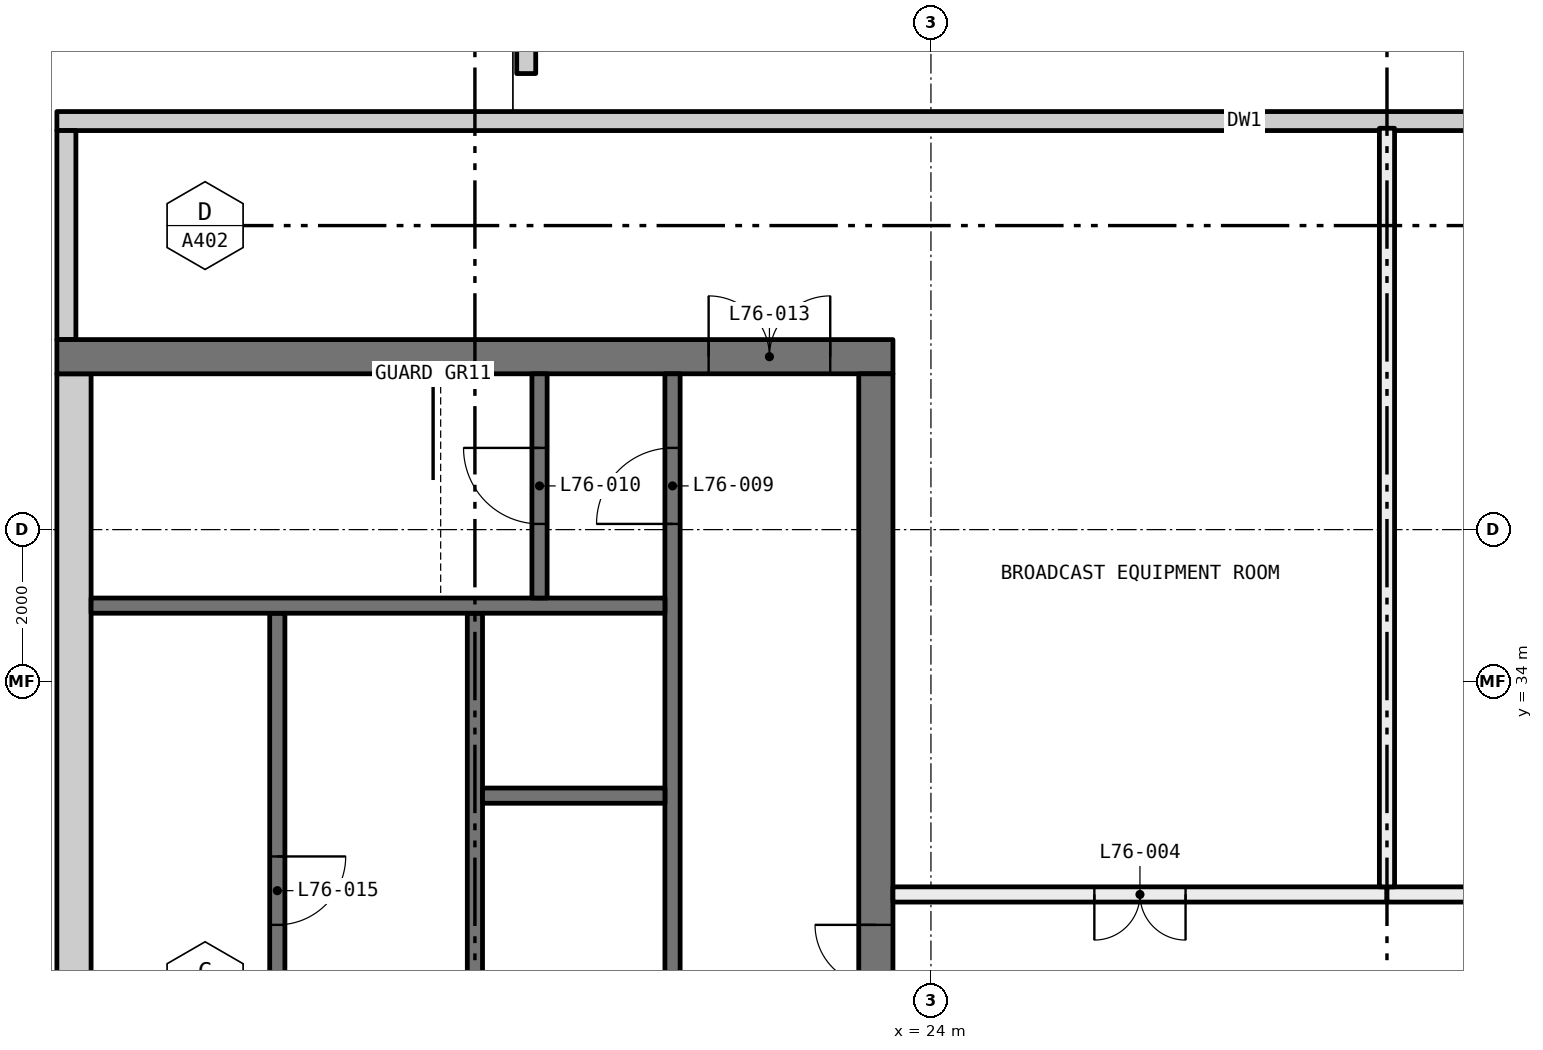
"""IFC4 building model, lengths in metres.
Left out: names, types, materials, properties, quantities, classifications, styles, units other than length and angle.
Written with IfcOpenShell. Run it as: python <this file> out.ifc"""

import sys

from ifc_helpers import new_model, si_unit, direction, frame, frame_2d, origin, place, context, subcontext, project, spatial, rectangle, extrude, element, fill, save


model = new_model("IFC4")
c1 = context("Model", 3, precision=1e-05, world=origin(), true_north=direction((0.0, 1.0)))
c2 = subcontext(c1, "Body", "Model", "MODEL_VIEW")
j1 = project(units=[si_unit("LENGTHUNIT", "METRE"), si_unit("PLANEANGLEUNIT", "RADIAN")], contexts=[c1])
p1 = place(None, origin())
s1 = spatial("IfcSite", under=j1, at=p1, CompositionType="ELEMENT")
p2 = place(p1, origin())
s2 = spatial("IfcBuilding", under=s1, at=p2, CompositionType="ELEMENT")
p3 = place(p2, frame((0.0, 0.0, 283.35)))
s3 = spatial("IfcBuildingStorey", under=s2, at=p3, CompositionType="ELEMENT", Elevation=283.35)
p4 = place(p3, frame((18.675, 42.0, 0.0), z_axis=(0.0, 0.0, 1.0), x_axis=(0.0, 1.0, 0.0)))
e1 = element("IfcWall", 1, at=p4, inside=s3, PredefinedType="PARAPET", context=c2, shape_type="SweptSolid", body=[
    extrude(rectangle(XDim=5.2, YDim=0.25, at=frame_2d((2.6, 0.0))), origin(), (0.0, 0.0, 1.0), 1.1),
])
p5 = place(p3, frame((30.0, 31.2, 0.0), z_axis=(0.0, 0.0, 1.0), x_axis=(-1.0, 0.0, 0.0)))
e2 = element("IfcWall", 2, at=p5, inside=s3, PredefinedType="PARTITIONING", context=c2, shape_type="SweptSolid", body=[
    extrude(rectangle(XDim=6.5, YDim=0.2, at=frame_2d((3.25, 0.0))), origin(), (0.0, 0.0, 1.0), 3.6),
])
p6 = place(p5, frame((2.65, 0.0, 0.0)))
e3 = element("IfcOpeningElement", 3, at=p6, cuts=e2, PredefinedType="OPENING", context=c2, shape_type="SweptSolid", body=[
    extrude(rectangle(XDim=1.2, YDim=2.1, at=frame_2d((0.6, 1.05))), frame((0.0, 0.11, 0.0), z_axis=(0.0, -1.0, 0.0), x_axis=(1.0, 0.0, 0.0)), (0.0, 0.0, 1.0), 0.22),
])
p7 = place(p3, frame((42.0, 31.2, 0.0), z_axis=(0.0, 0.0, 1.0), x_axis=(-1.0, 0.0, 0.0)))
e4 = element("IfcWall", 4, at=p7, inside=s3, PredefinedType="PARTITIONING", context=c2, shape_type="SweptSolid", body=[
    extrude(rectangle(XDim=12.0, YDim=0.2, at=frame_2d((6.0, 0.0))), origin(), (0.0, 0.0, 1.0), 3.6),
])
p8 = place(p7, frame((5.4, 0.0, 0.0)))
e5 = element("IfcOpeningElement", 5, at=p8, cuts=e4, PredefinedType="OPENING", context=c2, shape_type="SweptSolid", body=[
    extrude(rectangle(XDim=1.2, YDim=2.1, at=frame_2d((0.6, 1.05))), frame((0.0, 0.11, 0.0), z_axis=(0.0, -1.0, 0.0), x_axis=(1.0, 0.0, 0.0)), (0.0, 0.0, 1.0), 0.22),
])
p9 = place(p3, frame((30.0, 31.3, 0.0), z_axis=(0.0, 0.0, 1.0), x_axis=(0.0, 1.0, 0.0)))
e6 = element("IfcWall", 6, at=p9, inside=s3, PredefinedType="PARTITIONING", context=c2, shape_type="SweptSolid", body=[
    extrude(rectangle(XDim=9.98, YDim=0.2, at=frame_2d((4.99, 0.0))), origin(), (0.0, 0.0, 1.0), 5.6),
])
p10 = place(p3, frame((12.5, 38.275, 0.0), z_axis=(0.0, 0.0, 1.0), x_axis=(1.0, 0.0, 0.0)))
e7 = element("IfcWall", 7, at=p10, inside=s3, PredefinedType="SHEAR", context=c2, shape_type="SweptSolid", body=[
    extrude(rectangle(XDim=11.0, YDim=0.45, at=frame_2d((5.5, 0.0))), origin(), (0.0, 0.0, 1.0), 5.6),
])
p11 = place(p10, frame((8.575, 0.0, 0.0)))
e8 = element("IfcOpeningElement", 8, at=p11, cuts=e7, PredefinedType="OPENING", context=c2, shape_type="SweptSolid", body=[
    extrude(rectangle(XDim=1.6, YDim=2.1, at=frame_2d((0.8, 1.05))), frame((0.0, 0.235, 0.0), z_axis=(0.0, -1.0, 0.0), x_axis=(1.0, 0.0, 0.0)), (0.0, 0.0, 1.0), 0.47),
])
p12 = place(p3, frame((12.725, 21.95, 0.0), z_axis=(0.0, 0.0, 1.0), x_axis=(0.0, 1.0, 0.0)))
e9 = element("IfcWall", 9, at=p12, inside=s3, PredefinedType="SHEAR", context=c2, shape_type="SweptSolid", body=[
    extrude(rectangle(XDim=16.1, YDim=0.45, at=frame_2d((8.05, 0.0))), origin(), (0.0, 0.0, 1.0), 5.6),
])
p13 = place(p3, frame((23.275, 21.95, 0.0), z_axis=(0.0, 0.0, 1.0), x_axis=(0.0, 1.0, 0.0)))
e10 = element("IfcWall", 10, at=p13, inside=s3, PredefinedType="SHEAR", context=c2, shape_type="SweptSolid", body=[
    extrude(rectangle(XDim=16.1, YDim=0.45, at=frame_2d((8.05, 0.0))), origin(), (0.0, 0.0, 1.0), 5.6),
])
p14 = place(p13, frame((7.25, 0.0, 0.0)))
e11 = element("IfcOpeningElement", 11, at=p14, cuts=e10, PredefinedType="OPENING", context=c2, shape_type="SweptSolid", body=[
    extrude(rectangle(XDim=1.6, YDim=2.1, at=frame_2d((0.8, 1.05))), frame((0.0, 0.235, 0.0), z_axis=(0.0, -1.0, 0.0), x_axis=(1.0, 0.0, 0.0)), (0.0, 0.0, 1.0), 0.47),
])
p15 = place(p3, frame((15.4, 21.95, 0.0), z_axis=(0.0, 0.0, 1.0), x_axis=(0.0, 1.0, 0.0)))
e12 = element("IfcWall", 12, at=p15, inside=s3, PredefinedType="SOLIDWALL", context=c2, shape_type="SweptSolid", body=[
    extrude(rectangle(XDim=12.95, YDim=0.2, at=frame_2d((6.475, 0.0))), origin(), (0.0, 0.0, 1.0), 5.6),
])
p16 = place(p15, frame((3.75, 0.0, 0.0)))
e13 = element("IfcOpeningElement", 13, at=p16, cuts=e12, PredefinedType="OPENING", context=c2, shape_type="SweptSolid", body=[
    extrude(rectangle(XDim=1.1, YDim=2.1, at=frame_2d((0.55, 1.05))), frame((0.0, 0.11, 0.0), z_axis=(0.0, -1.0, 0.0), x_axis=(1.0, 0.0, 0.0)), (0.0, 0.0, 1.0), 0.22),
])
p17 = place(p15, frame((0.15, 0.0, 0.0)))
e14 = element("IfcOpeningElement", 14, at=p17, cuts=e12, PredefinedType="OPENING", context=c2, shape_type="SweptSolid", body=[
    extrude(rectangle(XDim=1.0, YDim=2.1, at=frame_2d((0.5, 1.05))), frame((0.0, 0.11, 0.0), z_axis=(0.0, -1.0, 0.0), x_axis=(1.0, 0.0, 0.0)), (0.0, 0.0, 1.0), 0.22),
])
p18 = place(p15, frame((8.85, 0.0, 0.0)))
e15 = element("IfcOpeningElement", 15, at=p18, cuts=e12, PredefinedType="OPENING", context=c2, shape_type="SweptSolid", body=[
    extrude(rectangle(XDim=0.9, YDim=2.1, at=frame_2d((0.45, 1.05))), frame((0.0, 0.11, 0.0), z_axis=(0.0, -1.0, 0.0), x_axis=(1.0, 0.0, 0.0)), (0.0, 0.0, 1.0), 0.22),
])
p19 = place(p3, frame((20.6, 25.1, 0.0), z_axis=(0.0, 0.0, 1.0), x_axis=(0.0, 1.0, 0.0)))
e16 = element("IfcWall", 16, at=p19, inside=s3, PredefinedType="SOLIDWALL", context=c2, shape_type="SweptSolid", body=[
    extrude(rectangle(XDim=12.95, YDim=0.2, at=frame_2d((6.475, 0.0))), origin(), (0.0, 0.0, 1.0), 5.6),
])
p20 = place(p19, frame((0.6, 0.0, 0.0)))
e17 = element("IfcOpeningElement", 17, at=p20, cuts=e16, PredefinedType="OPENING", context=c2, shape_type="SweptSolid", body=[
    extrude(rectangle(XDim=1.1, YDim=2.1, at=frame_2d((0.55, 1.05))), frame((0.0, 0.11, 0.0), z_axis=(0.0, -1.0, 0.0), x_axis=(1.0, 0.0, 0.0)), (0.0, 0.0, 1.0), 0.22),
])
p21 = place(p19, frame((10.975, 0.0, 0.0)))
e18 = element("IfcOpeningElement", 18, at=p21, cuts=e16, PredefinedType="OPENING", context=c2, shape_type="SweptSolid", body=[
    extrude(rectangle(XDim=1.0, YDim=2.1, at=frame_2d((0.5, 1.05))), frame((0.0, 0.11, 0.0), z_axis=(0.0, -1.0, 0.0), x_axis=(1.0, 0.0, 0.0)), (0.0, 0.0, 1.0), 0.22),
])
p22 = place(p3, frame((18.0, 25.1, 0.0), z_axis=(0.0, 0.0, 1.0), x_axis=(0.0, 1.0, 0.0)))
e19 = element("IfcWall", 19, at=p22, inside=s3, PredefinedType="SOLIDWALL", context=c2, shape_type="SweptSolid", body=[
    extrude(rectangle(XDim=9.8, YDim=0.2, at=frame_2d((4.9, 0.0))), origin(), (0.0, 0.0, 1.0), 5.6),
])
p23 = place(p3, frame((12.95, 35.0, 0.0), z_axis=(0.0, 0.0, 1.0), x_axis=(1.0, 0.0, 0.0)))
e20 = element("IfcWall", 20, at=p23, inside=s3, PredefinedType="SOLIDWALL", context=c2, shape_type="SweptSolid", body=[
    extrude(rectangle(XDim=7.55, YDim=0.2, at=frame_2d((3.775, 0.0))), origin(), (0.0, 0.0, 1.0), 5.6),
])
p24 = place(p3, frame((18.85, 35.1, 0.0), z_axis=(0.0, 0.0, 1.0), x_axis=(0.0, 1.0, 0.0)))
e21 = element("IfcWall", 21, at=p24, inside=s3, PredefinedType="SOLIDWALL", context=c2, shape_type="SweptSolid", body=[
    extrude(rectangle(XDim=2.95, YDim=0.2, at=frame_2d((1.475, 0.0))), origin(), (0.0, 0.0, 1.0), 5.6),
])
p25 = place(p24, frame((0.975, 0.0, 0.0)))
e22 = element("IfcOpeningElement", 22, at=p25, cuts=e21, PredefinedType="OPENING", context=c2, shape_type="SweptSolid", body=[
    extrude(rectangle(XDim=1.0, YDim=2.1, at=frame_2d((0.5, 1.05))), frame((0.0, 0.11, 0.0), z_axis=(0.0, -1.0, 0.0), x_axis=(1.0, 0.0, 0.0)), (0.0, 0.0, 1.0), 0.22),
])
p26 = place(p3, frame((18.1, 32.5, 0.0), z_axis=(0.0, 0.0, 1.0), x_axis=(1.0, 0.0, 0.0)))
e23 = element("IfcWall", 23, at=p26, inside=s3, PredefinedType="SOLIDWALL", context=c2, shape_type="SweptSolid", body=[
    extrude(rectangle(XDim=2.4, YDim=0.2, at=frame_2d((1.2, 0.0))), origin(), (0.0, 0.0, 1.0), 5.6),
])
p27 = place(p3, frame((12.5, 41.375, 0.0), z_axis=(0.0, 0.0, 1.0), x_axis=(1.0, 0.0, 0.0)))
e24 = element("IfcWall", 24, at=p27, inside=s3, PredefinedType="SOLIDWALL", context=c2, shape_type="SweptSolid", body=[
    extrude(rectangle(XDim=31.25, YDim=0.25, at=frame_2d((15.625, 0.0))), origin(), (0.0, 0.0, 1.0), 1.2),
])
p28 = place(p3, frame((12.625, 38.5, 0.0), z_axis=(0.0, 0.0, 1.0), x_axis=(0.0, 1.0, 0.0)))
e25 = element("IfcWall", 25, at=p28, inside=s3, PredefinedType="SOLIDWALL", context=c2, shape_type="SweptSolid", body=[
    extrude(rectangle(XDim=2.75, YDim=0.25, at=frame_2d((1.375, 0.0))), origin(), (0.0, 0.0, 1.0), 1.2),
])
p29 = place(p6, origin())
e26 = element("IfcDoor", 26, at=p29, inside=s3, OperationType="DOUBLE_DOOR_SINGLE_SWING", PredefinedType="DOOR", context=c2, shape_type="SweptSolid", body=[
    extrude(rectangle(XDim=1.2, YDim=2.1, at=frame_2d((0.6, 1.05))), frame((0.0, 0.025, 0.0), z_axis=(0.0, -1.0, 0.0), x_axis=(1.0, 0.0, 0.0)), (0.0, 0.0, 1.0), 0.05),
])
fill(e3, e26)
p30 = place(p21, origin())
e27 = element("IfcDoor", 27, at=p30, inside=s3, OperationType="SINGLE_SWING_RIGHT", PredefinedType="DOOR", context=c2, shape_type="SweptSolid", body=[
    extrude(rectangle(XDim=1.0, YDim=2.1, at=frame_2d((0.5, 1.05))), frame((0.0, 0.025, 0.0), z_axis=(0.0, -1.0, 0.0), x_axis=(1.0, 0.0, 0.0)), (0.0, 0.0, 1.0), 0.05),
])
fill(e18, e27)
p31 = place(p25, origin())
e28 = element("IfcDoor", 28, at=p31, inside=s3, OperationType="SINGLE_SWING_LEFT", PredefinedType="DOOR", context=c2, shape_type="SweptSolid", body=[
    extrude(rectangle(XDim=1.0, YDim=2.1, at=frame_2d((0.5, 1.05))), frame((0.0, 0.025, 0.0), z_axis=(0.0, -1.0, 0.0), x_axis=(1.0, 0.0, 0.0)), (0.0, 0.0, 1.0), 0.05),
])
fill(e22, e28)
p32 = place(p11, origin())
e29 = element("IfcDoor", 29, at=p32, inside=s3, OperationType="DOUBLE_DOOR_SINGLE_SWING", PredefinedType="DOOR", context=c2, shape_type="SweptSolid", body=[
    extrude(rectangle(XDim=1.6, YDim=2.1, at=frame_2d((0.8, 1.05))), frame((0.0, 0.025, 0.0), z_axis=(0.0, -1.0, 0.0), x_axis=(1.0, 0.0, 0.0)), (0.0, 0.0, 1.0), 0.05),
])
fill(e8, e29)
p33 = place(p14, origin())
e30 = element("IfcDoor", 30, at=p33, inside=s3, OperationType="DOUBLE_DOOR_SINGLE_SWING", PredefinedType="DOOR", context=c2, shape_type="SweptSolid", body=[
    extrude(rectangle(XDim=1.6, YDim=2.1, at=frame_2d((0.8, 1.05))), frame((0.0, 0.025, 0.0), z_axis=(0.0, -1.0, 0.0), x_axis=(1.0, 0.0, 0.0)), (0.0, 0.0, 1.0), 0.05),
])
fill(e11, e30)
p34 = place(p18, frame((0.9, 0.0, 0.0), x_axis=(-1.0, 0.0, 0.0)))
e31 = element("IfcDoor", 31, at=p34, inside=s3, OperationType="SINGLE_SWING_RIGHT", PredefinedType="DOOR", context=c2, shape_type="SweptSolid", body=[
    extrude(rectangle(XDim=0.9, YDim=2.1, at=frame_2d((0.45, 1.05))), frame((0.0, 0.025, 0.0), z_axis=(0.0, -1.0, 0.0), x_axis=(1.0, 0.0, 0.0)), (0.0, 0.0, 1.0), 0.05),
])
fill(e15, e31)
save(model, sys.argv[1])
